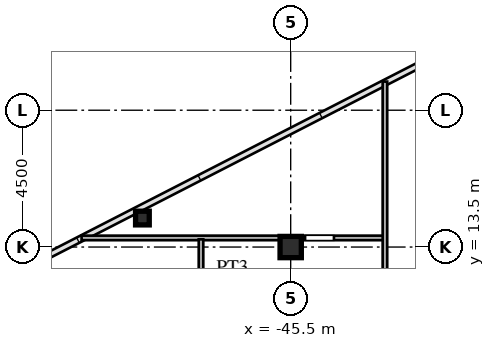
"""IFC4 building model, lengths in metres.
Left out: names, types, materials, properties, quantities, classifications, styles, units other than length and angle.
Written with IfcOpenShell. Run it as: python <this file> out.ifc"""

import sys

from ifc_helpers import new_model, si_unit, direction, frame, frame_2d, origin, origin_2d, place, context, subcontext, project, spatial, rectangle, hollow_rectangle, i_section, extrude, source, transform, mapped, element, save


model = new_model("IFC4")
c1 = context("Model", 3, precision=1e-05, world=origin(), true_north=direction((0.0, 1.0)))
c2 = subcontext(c1, "Body", "Model", "MODEL_VIEW")
j1 = project(units=[si_unit("LENGTHUNIT", "METRE"), si_unit("PLANEANGLEUNIT", "RADIAN")], contexts=[c1])
p1 = place(None, origin())
s1 = spatial("IfcSite", under=j1, at=p1, CompositionType="ELEMENT")
p2 = place(p1, origin())
s2 = spatial("IfcBuilding", under=s1, at=p2, CompositionType="ELEMENT")
p3 = place(p2, frame((0.0, 0.0, 117.6)))
s3 = spatial("IfcBuildingStorey", under=s2, at=p3, CompositionType="ELEMENT", Elevation=117.6)
m1 = source(origin(), c2, "Body", "SweptSolid", [
    extrude(i_section(OverallWidth=0.7, OverallDepth=0.7, WebThickness=0.028, FlangeThickness=0.045, at=origin_2d()), origin(), (0.0, 0.0, 1.0), 3.6),
])
p4 = place(p3, frame((-45.5, 13.5, 0.0), z_axis=(0.0, 0.0, 1.0), x_axis=(1.0, 0.0, 0.0)))
e1 = element("IfcColumn", 1, at=p4, inside=s3, PredefinedType="COLUMN", context=c2, shape_type="MappedRepresentation", body=[
    mapped(m1, transform((0.0, 0.0, 0.0), scale=1.0)),
])
m2 = source(origin(), c2, "Body", "SweptSolid", [
    extrude(hollow_rectangle(XDim=0.45, YDim=0.45, WallThickness=0.018, at=origin_2d()), origin(), (0.0, 0.0, 1.0), 3.6),
])
p5 = place(p3, frame((-50.377, 14.453, 0.0), z_axis=(0.0, 0.0, 1.0), x_axis=(1.0, 0.0, 0.0)))
e2 = element("IfcColumn", 2, at=p5, inside=s3, PredefinedType="COLUMN", context=c2, shape_type="MappedRepresentation", body=[
    mapped(m2, transform((0.0, 0.0, 0.0), scale=1.0)),
])
p6 = place(p3, frame((-52.378, 13.8, 0.0), z_axis=(0.0, 0.0, 1.0), x_axis=(1.0, 0.0, 0.0)))
e3 = element("IfcWall", 3, at=p6, inside=s3, PredefinedType="PARTITIONING", context=c2, shape_type="SweptSolid", body=[
    extrude(rectangle(XDim=9.928, YDim=0.15, at=frame_2d((4.964, 0.0))), origin(), (0.0, 0.0, 1.0), 2.78),
])
p7 = place(p6, frame((7.351, 0.0, 0.0)))
e4 = element("IfcOpeningElement", 4, at=p7, cuts=e3, PredefinedType="OPENING", context=c2, shape_type="SweptSolid", body=[
    extrude(rectangle(XDim=0.95, YDim=2.15, at=frame_2d((0.475, 1.075))), frame((0.0, 0.085, 0.0), z_axis=(0.0, -1.0, 0.0), x_axis=(1.0, 0.0, 0.0)), (0.0, 0.0, 1.0), 0.17),
])
p8 = place(p3, frame((-48.45, -10.35, 0.0), z_axis=(0.0, 0.0, 1.0), x_axis=(0.0, 1.0, 0.0)))
e5 = element("IfcWall", 5, at=p8, inside=s3, PredefinedType="PARTITIONING", context=c2, shape_type="SweptSolid", body=[
    extrude(rectangle(XDim=24.104, YDim=0.15, at=frame_2d((12.052, 0.0))), origin(), (0.0, 0.0, 1.0), 3.38),
])
p9 = place(p8, frame((6.475, 0.0, 0.0)))
e6 = element("IfcOpeningElement", 6, at=p9, cuts=e5, PredefinedType="OPENING", context=c2, shape_type="SweptSolid", body=[
    extrude(rectangle(XDim=0.95, YDim=2.15, at=frame_2d((0.475, 1.075))), frame((0.0, 0.085, 0.0), z_axis=(0.0, -1.0, 0.0), x_axis=(1.0, 0.0, 0.0)), (0.0, 0.0, 1.0), 0.17),
])
p10 = place(p8, frame((1.808, 0.0, 0.0)))
e7 = element("IfcOpeningElement", 7, at=p10, cuts=e5, PredefinedType="OPENING", context=c2, shape_type="SweptSolid", body=[
    extrude(rectangle(XDim=0.95, YDim=2.15, at=frame_2d((0.475, 1.075))), frame((0.0, 0.085, 0.0), z_axis=(0.0, -1.0, 0.0), x_axis=(1.0, 0.0, 0.0)), (0.0, 0.0, 1.0), 0.17),
])
p11 = place(p8, frame((21.128, 0.0, 0.0)))
e8 = element("IfcOpeningElement", 8, at=p11, cuts=e5, PredefinedType="OPENING", context=c2, shape_type="SweptSolid", body=[
    extrude(rectangle(XDim=0.95, YDim=2.15, at=frame_2d((0.475, 1.075))), frame((0.0, 0.085, 0.0), z_axis=(0.0, -1.0, 0.0), x_axis=(1.0, 0.0, 0.0)), (0.0, 0.0, 1.0), 0.17),
])
p12 = place(p8, frame((16.026, 0.0, 0.0)))
e9 = element("IfcOpeningElement", 9, at=p12, cuts=e5, PredefinedType="OPENING", context=c2, shape_type="SweptSolid", body=[
    extrude(rectangle(XDim=0.95, YDim=2.15, at=frame_2d((0.475, 1.075))), frame((0.0, 0.085, 0.0), z_axis=(0.0, -1.0, 0.0), x_axis=(1.0, 0.0, 0.0)), (0.0, 0.0, 1.0), 0.17),
])
p13 = place(p3, frame((-42.4, 8.752, 0.0), z_axis=(0.0, 0.0, 1.0), x_axis=(0.0, 1.0, 0.0)))
e10 = element("IfcWall", 10, at=p13, inside=s3, PredefinedType="PARTITIONING", context=c2, shape_type="SweptSolid", body=[
    extrude(rectangle(XDim=10.19, YDim=0.15, at=frame_2d((5.095, 0.0))), origin(), (0.0, 0.0, 1.0), 3.38),
])
p14 = place(p13, frame((0.688, 0.0, 0.0)))
e11 = element("IfcOpeningElement", 11, at=p14, cuts=e10, PredefinedType="OPENING", context=c2, shape_type="SweptSolid", body=[
    extrude(rectangle(XDim=0.95, YDim=2.15, at=frame_2d((0.475, 1.075))), frame((0.0, 0.085, 0.0), z_axis=(0.0, -1.0, 0.0), x_axis=(1.0, 0.0, 0.0)), (0.0, 0.0, 1.0), 0.17),
])
save(model, sys.argv[1])
